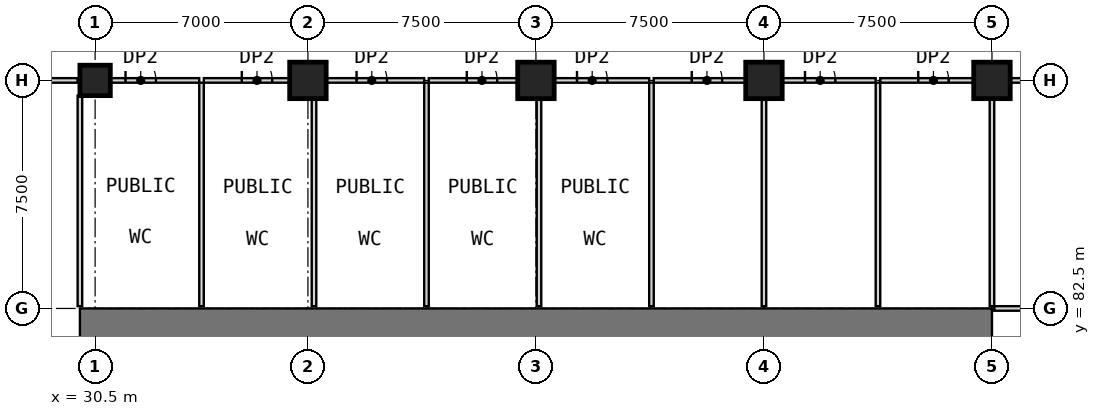
"""IFC4 building model, lengths in metres.
Left out: names, types, materials, properties, quantities, classifications, styles, units other than length and angle.
Written with IfcOpenShell. Run it as: python <this file> out.ifc"""

import sys

from ifc_helpers import new_model, si_unit, direction, frame, frame_2d, origin, origin_2d, place, context, subcontext, project, spatial, rectangle, extrude, element, fill, save


model = new_model("IFC4")
c1 = context("Model", 3, precision=1e-05, world=origin(), true_north=direction((0.0, 1.0)))
c2 = subcontext(c1, "Body", "Model", "MODEL_VIEW")
j1 = project(units=[si_unit("LENGTHUNIT", "METRE"), si_unit("PLANEANGLEUNIT", "RADIAN")], contexts=[c1])
p1 = place(None, origin())
s1 = spatial("IfcSite", under=j1, at=p1, CompositionType="ELEMENT")
p2 = place(p1, origin())
s2 = spatial("IfcBuilding", under=s1, at=p2, CompositionType="ELEMENT")
p3 = place(p2, origin())
s3 = spatial("IfcBuildingStorey", under=s2, at=p3, CompositionType="ELEMENT", Elevation=0.0)
p4 = place(p3, frame((30.5, 90.0, 0.0), z_axis=(0.0, 0.0, 1.0), x_axis=(1.0, 0.0, 0.0)))
e1 = element("IfcColumn", 1, at=p4, inside=s3, PredefinedType="COLUMN", context=c2, shape_type="SweptSolid", body=[
    extrude(rectangle(XDim=1.0, YDim=1.0, at=origin_2d()), origin(), (0.0, 0.0, 1.0), 8.0),
])
for number, where, z_axis, x_axis in (
    (2, (37.5, 90.0, 0.0), (0.0, 0.0, 1.0), (1.0, 0.0, 0.0)),
    (3, (45.0, 90.0, 0.0), (0.0, 0.0, 1.0), (1.0, 0.0, 0.0)),
    (4, (52.5, 90.0, 0.0), (0.0, 0.0, 1.0), (1.0, 0.0, 0.0)),
    (5, (60.0, 90.0, 0.0), (0.0, 0.0, 1.0), (1.0, 0.0, 0.0)),
):
    element("IfcColumn", number, at=place(p3, frame(where, z_axis=z_axis, x_axis=x_axis)), inside=s3, PredefinedType="COLUMN", context=c2, shape_type="SweptSolid", body=[
        extrude(rectangle(XDim=1.2, YDim=1.2, at=origin_2d()), origin(), (0.0, 0.0, 1.0), 8.0),
    ])
p5 = place(p3, frame((30.0, 82.0, 0.0), z_axis=(0.0, 0.0, 1.0), x_axis=(1.0, 0.0, 0.0)))
e6 = element("IfcWall", 6, at=p5, inside=s3, PredefinedType="SHEAR", context=c2, shape_type="SweptSolid", body=[
    extrude(rectangle(XDim=30.0, YDim=1.0, at=frame_2d((15.0, 0.0))), origin(), (0.0, 0.0, 1.0), 8.0),
])
p6 = place(p3, frame((23.6, 90.0, 0.0), z_axis=(0.0, 0.0, 1.0), x_axis=(1.0, 0.0, 0.0)))
e7 = element("IfcWall", 7, at=p6, inside=s3, PredefinedType="PARTITIONING", context=c2, shape_type="SweptSolid", body=[
    extrude(rectangle(XDim=6.325, YDim=0.15, at=frame_2d((3.163, 0.0))), origin(), (0.0, 0.0, 1.0), 7.7),
])
p7 = place(p6, frame((2.0, 0.0, 0.0)))
e8 = element("IfcOpeningElement", 8, at=p7, cuts=e7, PredefinedType="OPENING", context=c2, shape_type="SweptSolid", body=[
    extrude(rectangle(XDim=1.8, YDim=2.4, at=frame_2d((0.9, 1.2))), frame((0.0, 0.085, 0.0), z_axis=(0.0, -1.0, 0.0), x_axis=(1.0, 0.0, 0.0)), (0.0, 0.0, 1.0), 0.17),
])
p8 = place(p3, frame((31.0, 90.0, 0.0), z_axis=(0.0, 0.0, 1.0), x_axis=(1.0, 0.0, 0.0)))
e9 = element("IfcWall", 9, at=p8, inside=s3, PredefinedType="PARTITIONING", context=c2, shape_type="SweptSolid", body=[
    extrude(rectangle(XDim=2.925, YDim=0.15, at=frame_2d((1.462, 0.0))), origin(), (0.0, 0.0, 1.0), 7.7),
])
p9 = place(p8, frame((0.5, 0.0, 0.0)))
e10 = element("IfcOpeningElement", 10, at=p9, cuts=e9, PredefinedType="OPENING", context=c2, shape_type="SweptSolid", body=[
    extrude(rectangle(XDim=1.0, YDim=2.1, at=frame_2d((0.5, 1.05))), frame((0.0, 0.085, 0.0), z_axis=(0.0, -1.0, 0.0), x_axis=(1.0, 0.0, 0.0)), (0.0, 0.0, 1.0), 0.17),
])
p10 = place(p3, frame((34.075, 90.0, 0.0), z_axis=(0.0, 0.0, 1.0), x_axis=(1.0, 0.0, 0.0)))
e11 = element("IfcWall", 11, at=p10, inside=s3, PredefinedType="PARTITIONING", context=c2, shape_type="SweptSolid", body=[
    extrude(rectangle(XDim=2.825, YDim=0.15, at=frame_2d((1.413, 0.0))), origin(), (0.0, 0.0, 1.0), 7.7),
])
p11 = place(p10, frame((1.25, 0.0, 0.0)))
e12 = element("IfcOpeningElement", 12, at=p11, cuts=e11, PredefinedType="OPENING", context=c2, shape_type="SweptSolid", body=[
    extrude(rectangle(XDim=1.0, YDim=2.1, at=frame_2d((0.5, 1.05))), frame((0.0, 0.085, 0.0), z_axis=(0.0, -1.0, 0.0), x_axis=(1.0, 0.0, 0.0)), (0.0, 0.0, 1.0), 0.17),
])
p12 = place(p3, frame((38.1, 90.0, 0.0), z_axis=(0.0, 0.0, 1.0), x_axis=(1.0, 0.0, 0.0)))
e13 = element("IfcWall", 13, at=p12, inside=s3, PredefinedType="PARTITIONING", context=c2, shape_type="SweptSolid", body=[
    extrude(rectangle(XDim=3.225, YDim=0.15, at=frame_2d((1.612, 0.0))), origin(), (0.0, 0.0, 1.0), 7.7),
])
p13 = place(p12, frame((1.0, 0.0, 0.0)))
e14 = element("IfcOpeningElement", 14, at=p13, cuts=e13, PredefinedType="OPENING", context=c2, shape_type="SweptSolid", body=[
    extrude(rectangle(XDim=1.0, YDim=2.1, at=frame_2d((0.5, 1.05))), frame((0.0, 0.085, 0.0), z_axis=(0.0, -1.0, 0.0), x_axis=(1.0, 0.0, 0.0)), (0.0, 0.0, 1.0), 0.17),
])
p14 = place(p3, frame((41.475, 90.0, 0.0), z_axis=(0.0, 0.0, 1.0), x_axis=(1.0, 0.0, 0.0)))
e15 = element("IfcWall", 15, at=p14, inside=s3, PredefinedType="PARTITIONING", context=c2, shape_type="SweptSolid", body=[
    extrude(rectangle(XDim=2.925, YDim=0.15, at=frame_2d((1.462, 0.0))), origin(), (0.0, 0.0, 1.0), 7.7),
])
p15 = place(p14, frame((1.25, 0.0, 0.0)))
e16 = element("IfcOpeningElement", 16, at=p15, cuts=e15, PredefinedType="OPENING", context=c2, shape_type="SweptSolid", body=[
    extrude(rectangle(XDim=1.0, YDim=2.1, at=frame_2d((0.5, 1.05))), frame((0.0, 0.085, 0.0), z_axis=(0.0, -1.0, 0.0), x_axis=(1.0, 0.0, 0.0)), (0.0, 0.0, 1.0), 0.17),
])
p16 = place(p3, frame((45.6, 90.0, 0.0), z_axis=(0.0, 0.0, 1.0), x_axis=(1.0, 0.0, 0.0)))
e17 = element("IfcWall", 17, at=p16, inside=s3, PredefinedType="PARTITIONING", context=c2, shape_type="SweptSolid", body=[
    extrude(rectangle(XDim=3.125, YDim=0.15, at=frame_2d((1.562, 0.0))), origin(), (0.0, 0.0, 1.0), 7.7),
])
p17 = place(p16, frame((0.75, 0.0, 0.0)))
e18 = element("IfcOpeningElement", 18, at=p17, cuts=e17, PredefinedType="OPENING", context=c2, shape_type="SweptSolid", body=[
    extrude(rectangle(XDim=1.0, YDim=2.1, at=frame_2d((0.5, 1.05))), frame((0.0, 0.085, 0.0), z_axis=(0.0, -1.0, 0.0), x_axis=(1.0, 0.0, 0.0)), (0.0, 0.0, 1.0), 0.17),
])
p18 = place(p3, frame((48.875, 90.0, 0.0), z_axis=(0.0, 0.0, 1.0), x_axis=(1.0, 0.0, 0.0)))
e19 = element("IfcWall", 19, at=p18, inside=s3, PredefinedType="PARTITIONING", context=c2, shape_type="SweptSolid", body=[
    extrude(rectangle(XDim=3.025, YDim=0.15, at=frame_2d((1.512, 0.0))), origin(), (0.0, 0.0, 1.0), 7.7),
])
p19 = place(p18, frame((1.25, 0.0, 0.0)))
e20 = element("IfcOpeningElement", 20, at=p19, cuts=e19, PredefinedType="OPENING", context=c2, shape_type="SweptSolid", body=[
    extrude(rectangle(XDim=1.0, YDim=2.1, at=frame_2d((0.5, 1.05))), frame((0.0, 0.085, 0.0), z_axis=(0.0, -1.0, 0.0), x_axis=(1.0, 0.0, 0.0)), (0.0, 0.0, 1.0), 0.17),
])
p20 = place(p3, frame((53.1, 90.0, 0.0), z_axis=(0.0, 0.0, 1.0), x_axis=(1.0, 0.0, 0.0)))
e21 = element("IfcWall", 21, at=p20, inside=s3, PredefinedType="PARTITIONING", context=c2, shape_type="SweptSolid", body=[
    extrude(rectangle(XDim=3.075, YDim=0.15, at=frame_2d((1.538, 0.0))), origin(), (0.0, 0.0, 1.0), 7.7),
])
p21 = place(p20, frame((0.75, 0.0, 0.0)))
e22 = element("IfcOpeningElement", 22, at=p21, cuts=e21, PredefinedType="OPENING", context=c2, shape_type="SweptSolid", body=[
    extrude(rectangle(XDim=1.0, YDim=2.1, at=frame_2d((0.5, 1.05))), frame((0.0, 0.085, 0.0), z_axis=(0.0, -1.0, 0.0), x_axis=(1.0, 0.0, 0.0)), (0.0, 0.0, 1.0), 0.17),
])
p22 = place(p3, frame((56.325, 90.0, 0.0), z_axis=(0.0, 0.0, 1.0), x_axis=(1.0, 0.0, 0.0)))
e23 = element("IfcWall", 23, at=p22, inside=s3, PredefinedType="PARTITIONING", context=c2, shape_type="SweptSolid", body=[
    extrude(rectangle(XDim=3.075, YDim=0.15, at=frame_2d((1.538, 0.0))), origin(), (0.0, 0.0, 1.0), 7.7),
])
p23 = place(p22, frame((1.25, 0.0, 0.0)))
e24 = element("IfcOpeningElement", 24, at=p23, cuts=e23, PredefinedType="OPENING", context=c2, shape_type="SweptSolid", body=[
    extrude(rectangle(XDim=1.0, YDim=2.1, at=frame_2d((0.5, 1.05))), frame((0.0, 0.085, 0.0), z_axis=(0.0, -1.0, 0.0), x_axis=(1.0, 0.0, 0.0)), (0.0, 0.0, 1.0), 0.17),
])
p24 = place(p3, frame((60.6, 90.0, 0.0), z_axis=(0.0, 0.0, 1.0), x_axis=(1.0, 0.0, 0.0)))
e25 = element("IfcWall", 25, at=p24, inside=s3, PredefinedType="PARTITIONING", context=c2, shape_type="SweptSolid", body=[
    extrude(rectangle(XDim=6.3, YDim=0.15, at=frame_2d((3.15, 0.0))), origin(), (0.0, 0.0, 1.0), 7.7),
])
p25 = place(p24, frame((2.75, 0.0, 0.0)))
e26 = element("IfcOpeningElement", 26, at=p25, cuts=e25, PredefinedType="OPENING", context=c2, shape_type="SweptSolid", body=[
    extrude(rectangle(XDim=1.0, YDim=2.1, at=frame_2d((0.5, 1.05))), frame((0.0, 0.085, 0.0), z_axis=(0.0, -1.0, 0.0), x_axis=(1.0, 0.0, 0.0)), (0.0, 0.0, 1.0), 0.17),
])
for number, where, z_axis, x_axis in (
    (27, (60.075, 82.5, 0.0), (0.0, 0.0, 1.0), (1.0, 0.0, 0.0)),
    (28, (52.5, 82.575, 0.0), (0.0, 0.0, 1.0), (0.0, 1.0, 0.0)),
    (29, (60.0, 82.575, 0.0), (0.0, 0.0, 1.0), (0.0, 1.0, 0.0)),
):
    element("IfcWall", number, at=place(p3, frame(where, z_axis=z_axis, x_axis=x_axis)), inside=s3, PredefinedType="PARTITIONING", context=c2, shape_type="SweptSolid", body=[
        extrude(rectangle(XDim=6.825, YDim=0.15, at=frame_2d((3.413, 0.0))), origin(), (0.0, 0.0, 1.0), 7.7),
    ])
p26 = place(p3, frame((30.0, 82.575, 0.0), z_axis=(0.0, 0.0, 1.0), x_axis=(0.0, 1.0, 0.0)))
e30 = element("IfcWall", 30, at=p26, inside=s3, PredefinedType="PARTITIONING", context=c2, shape_type="SweptSolid", body=[
    extrude(rectangle(XDim=6.925, YDim=0.15, at=frame_2d((3.462, 0.0))), origin(), (0.0, 0.0, 1.0), 7.7),
])
p27 = place(p3, frame((34.0, 82.575, 0.0), z_axis=(0.0, 0.0, 1.0), x_axis=(0.0, 1.0, 0.0)))
e31 = element("IfcWall", 31, at=p27, inside=s3, PredefinedType="PARTITIONING", context=c2, shape_type="SweptSolid", body=[
    extrude(rectangle(XDim=7.35, YDim=0.15, at=frame_2d((3.675, 0.0))), origin(), (0.0, 0.0, 1.0), 7.7),
])
p28 = place(p3, frame((37.7, 82.575, 0.0), z_axis=(0.0, 0.0, 1.0), x_axis=(0.0, 1.0, 0.0)))
e32 = element("IfcWall", 32, at=p28, inside=s3, PredefinedType="PARTITIONING", context=c2, shape_type="SweptSolid", body=[
    extrude(rectangle(XDim=6.825, YDim=0.15, at=frame_2d((3.413, 0.0))), origin(), (0.0, 0.0, 1.0), 7.7),
])
p29 = place(p3, frame((41.4, 82.575, 0.0), z_axis=(0.0, 0.0, 1.0), x_axis=(0.0, 1.0, 0.0)))
e33 = element("IfcWall", 33, at=p29, inside=s3, PredefinedType="PARTITIONING", context=c2, shape_type="SweptSolid", body=[
    extrude(rectangle(XDim=7.35, YDim=0.15, at=frame_2d((3.675, 0.0))), origin(), (0.0, 0.0, 1.0), 7.7),
])
p30 = place(p3, frame((45.1, 82.575, 0.0), z_axis=(0.0, 0.0, 1.0), x_axis=(0.0, 1.0, 0.0)))
e34 = element("IfcWall", 34, at=p30, inside=s3, PredefinedType="PARTITIONING", context=c2, shape_type="SweptSolid", body=[
    extrude(rectangle(XDim=6.825, YDim=0.15, at=frame_2d((3.413, 0.0))), origin(), (0.0, 0.0, 1.0), 7.7),
])
for number, where, z_axis, x_axis in (
    (35, (48.8, 82.575, 0.0), (0.0, 0.0, 1.0), (0.0, 1.0, 0.0)),
    (36, (56.25, 82.575, 0.0), (0.0, 0.0, 1.0), (0.0, 1.0, 0.0)),
):
    element("IfcWall", number, at=place(p3, frame(where, z_axis=z_axis, x_axis=x_axis)), inside=s3, PredefinedType="PARTITIONING", context=c2, shape_type="SweptSolid", body=[
        extrude(rectangle(XDim=7.35, YDim=0.15, at=frame_2d((3.675, 0.0))), origin(), (0.0, 0.0, 1.0), 7.7),
    ])
p31 = place(p9, origin())
e37 = element("IfcDoor", 37, at=p31, inside=s3, OperationType="SINGLE_SWING_LEFT", PredefinedType="DOOR", context=c2, shape_type="SweptSolid", body=[
    extrude(rectangle(XDim=1.0, YDim=2.1, at=frame_2d((0.5, 1.05))), frame((0.0, 0.025, 0.0), z_axis=(0.0, -1.0, 0.0), x_axis=(1.0, 0.0, 0.0)), (0.0, 0.0, 1.0), 0.05),
])
fill(e10, e37)
p32 = place(p11, origin())
e38 = element("IfcDoor", 38, at=p32, inside=s3, OperationType="SINGLE_SWING_LEFT", PredefinedType="DOOR", context=c2, shape_type="SweptSolid", body=[
    extrude(rectangle(XDim=1.0, YDim=2.1, at=frame_2d((0.5, 1.05))), frame((0.0, 0.025, 0.0), z_axis=(0.0, -1.0, 0.0), x_axis=(1.0, 0.0, 0.0)), (0.0, 0.0, 1.0), 0.05),
])
fill(e12, e38)
p33 = place(p13, origin())
e39 = element("IfcDoor", 39, at=p33, inside=s3, OperationType="SINGLE_SWING_LEFT", PredefinedType="DOOR", context=c2, shape_type="SweptSolid", body=[
    extrude(rectangle(XDim=1.0, YDim=2.1, at=frame_2d((0.5, 1.05))), frame((0.0, 0.025, 0.0), z_axis=(0.0, -1.0, 0.0), x_axis=(1.0, 0.0, 0.0)), (0.0, 0.0, 1.0), 0.05),
])
fill(e14, e39)
p34 = place(p15, origin())
e40 = element("IfcDoor", 40, at=p34, inside=s3, OperationType="SINGLE_SWING_LEFT", PredefinedType="DOOR", context=c2, shape_type="SweptSolid", body=[
    extrude(rectangle(XDim=1.0, YDim=2.1, at=frame_2d((0.5, 1.05))), frame((0.0, 0.025, 0.0), z_axis=(0.0, -1.0, 0.0), x_axis=(1.0, 0.0, 0.0)), (0.0, 0.0, 1.0), 0.05),
])
fill(e16, e40)
p35 = place(p17, origin())
e41 = element("IfcDoor", 41, at=p35, inside=s3, OperationType="SINGLE_SWING_LEFT", PredefinedType="DOOR", context=c2, shape_type="SweptSolid", body=[
    extrude(rectangle(XDim=1.0, YDim=2.1, at=frame_2d((0.5, 1.05))), frame((0.0, 0.025, 0.0), z_axis=(0.0, -1.0, 0.0), x_axis=(1.0, 0.0, 0.0)), (0.0, 0.0, 1.0), 0.05),
])
fill(e18, e41)
p36 = place(p19, origin())
e42 = element("IfcDoor", 42, at=p36, inside=s3, OperationType="SINGLE_SWING_LEFT", PredefinedType="DOOR", context=c2, shape_type="SweptSolid", body=[
    extrude(rectangle(XDim=1.0, YDim=2.1, at=frame_2d((0.5, 1.05))), frame((0.0, 0.025, 0.0), z_axis=(0.0, -1.0, 0.0), x_axis=(1.0, 0.0, 0.0)), (0.0, 0.0, 1.0), 0.05),
])
fill(e20, e42)
p37 = place(p21, origin())
e43 = element("IfcDoor", 43, at=p37, inside=s3, OperationType="SINGLE_SWING_LEFT", PredefinedType="DOOR", context=c2, shape_type="SweptSolid", body=[
    extrude(rectangle(XDim=1.0, YDim=2.1, at=frame_2d((0.5, 1.05))), frame((0.0, 0.025, 0.0), z_axis=(0.0, -1.0, 0.0), x_axis=(1.0, 0.0, 0.0)), (0.0, 0.0, 1.0), 0.05),
])
fill(e22, e43)
p38 = place(p23, origin())
e44 = element("IfcDoor", 44, at=p38, inside=s3, OperationType="SINGLE_SWING_LEFT", PredefinedType="DOOR", context=c2, shape_type="SweptSolid", body=[
    extrude(rectangle(XDim=1.0, YDim=2.1, at=frame_2d((0.5, 1.05))), frame((0.0, 0.025, 0.0), z_axis=(0.0, -1.0, 0.0), x_axis=(1.0, 0.0, 0.0)), (0.0, 0.0, 1.0), 0.05),
])
fill(e24, e44)
save(model, sys.argv[1])
